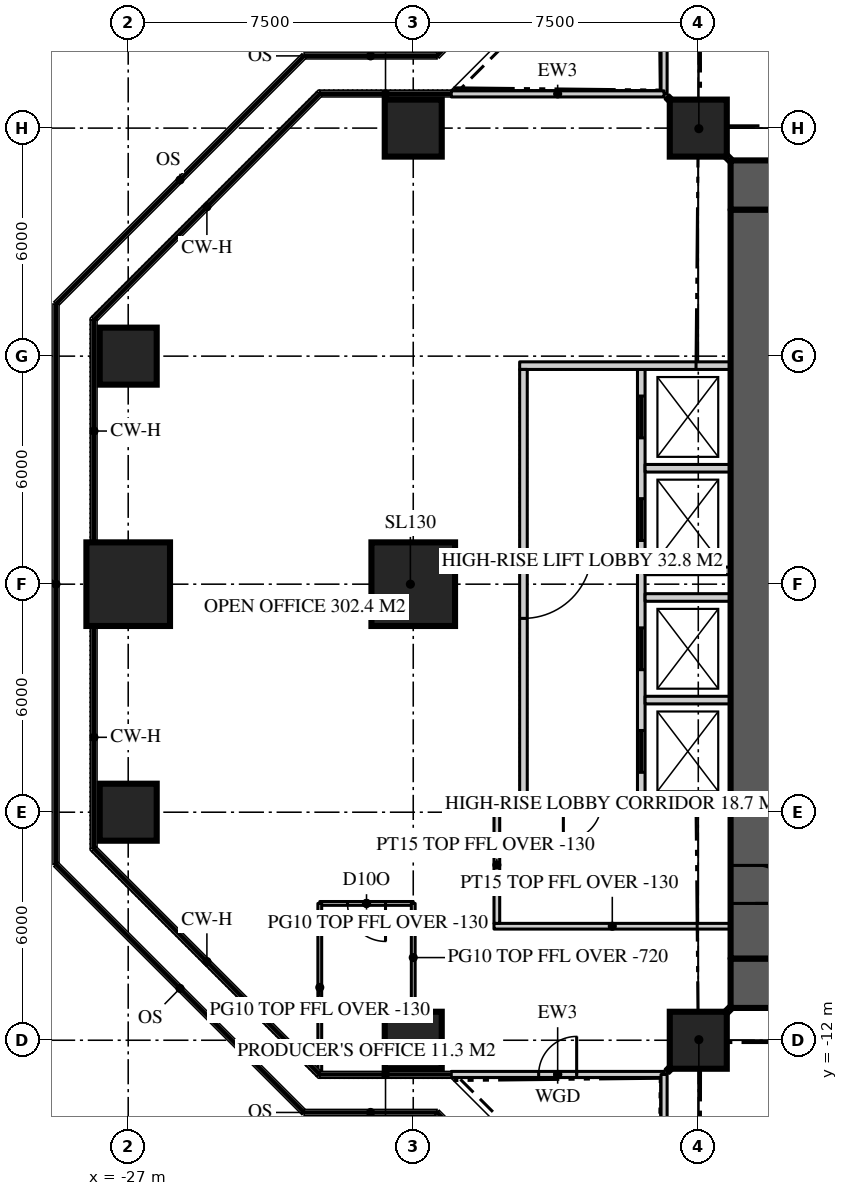
"""IFC4 building model, lengths in metres.
Left out: names, types, materials, properties, quantities, classifications, styles, units other than length and angle.
Written with IfcOpenShell. Run it as: python <this file> out.ifc"""

import sys

from ifc_helpers import new_model, si_unit, direction, frame, frame_2d, origin, origin_2d, place, context, subcontext, project, spatial, rectangle, extrude, element, fill, save


model = new_model("IFC4")
c1 = context("Model", 3, precision=1e-05, world=origin(), true_north=direction((0.0, 1.0)))
c2 = subcontext(c1, "Body", "Model", "MODEL_VIEW")
j1 = project(units=[si_unit("LENGTHUNIT", "METRE"), si_unit("PLANEANGLEUNIT", "RADIAN")], contexts=[c1])
p1 = place(None, origin())
s1 = spatial("IfcSite", under=j1, at=p1, CompositionType="ELEMENT")
p2 = place(p1, origin())
s2 = spatial("IfcBuilding", under=s1, at=p2, CompositionType="ELEMENT")
p3 = place(p2, frame((0.0, 0.0, 228.3)))
s3 = spatial("IfcBuildingStorey", under=s2, at=p3, CompositionType="ELEMENT", Elevation=228.3)
p4 = place(p3, frame((-11.15, 10.5, 0.0), z_axis=(0.0, 0.0, 1.0), x_axis=(1.0, 0.0, 0.0)))
e1 = element("IfcWall", 1, at=p4, inside=s3, PredefinedType="SHEAR", context=c2, shape_type="SweptSolid", body=[
    extrude(rectangle(XDim=22.3, YDim=1.3, at=frame_2d((11.15, 0.0))), origin(), (0.0, 0.0, 1.0), 3.9),
])
p5 = place(p4, frame((4.25, 0.0, 0.0)))
e2 = element("IfcOpeningElement", 2, at=p5, cuts=e1, PredefinedType="OPENING", context=c2, shape_type="SweptSolid", body=[
    extrude(rectangle(XDim=1.8, YDim=2.2, at=frame_2d((0.9, 1.1))), frame((0.0, 0.66, 0.0), z_axis=(0.0, -1.0, 0.0), x_axis=(1.0, 0.0, 0.0)), (0.0, 0.0, 1.0), 1.32),
])
p6 = place(p4, frame((16.25, 0.0, 0.0)))
e3 = element("IfcOpeningElement", 3, at=p6, cuts=e1, PredefinedType="OPENING", context=c2, shape_type="SweptSolid", body=[
    extrude(rectangle(XDim=1.8, YDim=2.2, at=frame_2d((0.9, 1.1))), frame((0.0, 0.66, 0.0), z_axis=(0.0, -1.0, 0.0), x_axis=(1.0, 0.0, 0.0)), (0.0, 0.0, 1.0), 1.32),
])
p7 = place(p3, frame((11.15, -10.5, 0.0), z_axis=(0.0, 0.0, 1.0), x_axis=(-1.0, 0.0, 0.0)))
e4 = element("IfcWall", 4, at=p7, inside=s3, PredefinedType="SHEAR", context=c2, shape_type="SweptSolid", body=[
    extrude(rectangle(XDim=22.3, YDim=1.3, at=frame_2d((11.15, 0.0))), origin(), (0.0, 0.0, 1.0), 3.9),
])
p8 = place(p7, frame((16.25, 0.0, 0.0)))
e5 = element("IfcOpeningElement", 5, at=p8, cuts=e4, PredefinedType="OPENING", context=c2, shape_type="SweptSolid", body=[
    extrude(rectangle(XDim=1.8, YDim=2.2, at=frame_2d((0.9, 1.1))), frame((0.0, 0.66, 0.0), z_axis=(0.0, -1.0, 0.0), x_axis=(1.0, 0.0, 0.0)), (0.0, 0.0, 1.0), 1.32),
])
p9 = place(p7, frame((4.25, 0.0, 0.0)))
e6 = element("IfcOpeningElement", 6, at=p9, cuts=e4, PredefinedType="OPENING", context=c2, shape_type="SweptSolid", body=[
    extrude(rectangle(XDim=1.8, YDim=2.2, at=frame_2d((0.9, 1.1))), frame((0.0, 0.66, 0.0), z_axis=(0.0, -1.0, 0.0), x_axis=(1.0, 0.0, 0.0)), (0.0, 0.0, 1.0), 1.32),
])
p10 = place(p3, frame((-10.5, 9.85, 0.0), z_axis=(0.0, 0.0, 1.0), x_axis=(0.0, -1.0, 0.0)))
e7 = element("IfcWall", 7, at=p10, inside=s3, PredefinedType="SHEAR", context=c2, shape_type="SweptSolid", body=[
    extrude(rectangle(XDim=19.7, YDim=1.3, at=frame_2d((9.85, 0.0))), origin(), (0.0, 0.0, 1.0), 3.9),
])
p11 = place(p10, frame((17.25, 0.0, 0.0)))
e8 = element("IfcOpeningElement", 8, at=p11, cuts=e7, PredefinedType="OPENING", context=c2, shape_type="SweptSolid", body=[
    extrude(rectangle(XDim=1.0, YDim=2.2, at=frame_2d((0.5, 1.1))), frame((0.0, 0.66, 0.0), z_axis=(0.0, -1.0, 0.0), x_axis=(1.0, 0.0, 0.0)), (0.0, 0.0, 1.0), 1.32),
])
for number, where, z_axis, x_axis in (
    (9, (-19.5, -12.0, 0.0), (0.0, 0.0, 1.0), (1.0, 0.0, 0.0)),
    (10, (-12.0, -12.0, 0.0), (0.0, 0.0, 1.0), (1.0, 0.0, 0.0)),
    (11, (-27.0, -6.0, 0.0), (0.0, 0.0, 1.0), (1.0, 0.0, 0.0)),
):
    element("IfcColumn", number, at=place(p3, frame(where, z_axis=z_axis, x_axis=x_axis)), inside=s3, PredefinedType="COLUMN", context=c2, shape_type="SweptSolid", body=[
        extrude(rectangle(XDim=1.5, YDim=1.5, at=origin_2d()), origin(), (0.0, 0.0, 1.0), 3.9),
    ])
for number, where, z_axis, x_axis in (
    (12, (-27.0, 0.0, 0.0), (0.0, 0.0, 1.0), (1.0, 0.0, 0.0)),
    (13, (-19.5, 0.0, 0.0), (0.0, 0.0, 1.0), (1.0, 0.0, 0.0)),
):
    element("IfcColumn", number, at=place(p3, frame(where, z_axis=z_axis, x_axis=x_axis)), inside=s3, PredefinedType="COLUMN", context=c2, shape_type="SweptSolid", body=[
        extrude(rectangle(XDim=2.2, YDim=2.2, at=origin_2d()), origin(), (0.0, 0.0, 1.0), 3.9),
    ])
for number, where, z_axis, x_axis in (
    (14, (-27.0, 6.0, 0.0), (0.0, 0.0, 1.0), (1.0, 0.0, 0.0)),
    (15, (-19.5, 12.0, 0.0), (0.0, 0.0, 1.0), (1.0, 0.0, 0.0)),
    (16, (-12.0, 12.0, 0.0), (0.0, 0.0, 1.0), (1.0, 0.0, 0.0)),
):
    element("IfcColumn", number, at=place(p3, frame(where, z_axis=z_axis, x_axis=x_axis)), inside=s3, PredefinedType="COLUMN", context=c2, shape_type="SweptSolid", body=[
        extrude(rectangle(XDim=1.5, YDim=1.5, at=origin_2d()), origin(), (0.0, 0.0, 1.0), 3.9),
    ])
p12 = place(p3, frame((-12.9, 18.5, 0.0), z_axis=(0.0, 0.0, 1.0), x_axis=(0.0, -1.0, 0.0)))
e17 = element("IfcWall", 17, at=p12, inside=s3, PredefinedType="SOLIDWALL", context=c2, shape_type="SweptSolid", body=[
    extrude(rectangle(XDim=5.6, YDim=0.16, at=frame_2d((2.8, 0.0))), origin(), (0.0, 0.0, 1.0), 3.77),
])
p13 = place(p12, frame((2.3, 0.0, 0.0)))
e18 = element("IfcOpeningElement", 18, at=p13, cuts=e17, PredefinedType="OPENING", context=c2, shape_type="SweptSolid", body=[
    extrude(rectangle(XDim=1.0, YDim=2.2, at=frame_2d((0.5, 1.1))), frame((0.0, 0.09, 0.0), z_axis=(0.0, -1.0, 0.0), x_axis=(1.0, 0.0, 0.0)), (0.0, 0.0, 1.0), 0.18),
])
p14 = place(p3, frame((-12.9, 12.9, 0.0), z_axis=(0.0, 0.0, 1.0), x_axis=(-1.0, 0.0, 0.0)))
e19 = element("IfcWall", 19, at=p14, inside=s3, PredefinedType="SOLIDWALL", context=c2, shape_type="SweptSolid", body=[
    extrude(rectangle(XDim=5.6, YDim=0.16, at=frame_2d((2.8, 0.0))), origin(), (0.0, 0.0, 1.0), 3.77),
])
p15 = place(p3, frame((-18.5, -12.9, 0.0), z_axis=(0.0, 0.0, 1.0), x_axis=(1.0, 0.0, 0.0)))
e20 = element("IfcWall", 20, at=p15, inside=s3, PredefinedType="SOLIDWALL", context=c2, shape_type="SweptSolid", body=[
    extrude(rectangle(XDim=5.6, YDim=0.16, at=frame_2d((2.8, 0.0))), origin(), (0.0, 0.0, 1.0), 3.77),
])
p16 = place(p15, frame((2.3, 0.0, 0.0)))
e21 = element("IfcOpeningElement", 21, at=p16, cuts=e20, PredefinedType="OPENING", context=c2, shape_type="SweptSolid", body=[
    extrude(rectangle(XDim=1.0, YDim=2.2, at=frame_2d((0.5, 1.1))), frame((0.0, 0.09, 0.0), z_axis=(0.0, -1.0, 0.0), x_axis=(1.0, 0.0, 0.0)), (0.0, 0.0, 1.0), 0.18),
])
p17 = place(p3, frame((-12.9, -12.9, 0.0), z_axis=(0.0, 0.0, 1.0), x_axis=(0.0, -1.0, 0.0)))
e22 = element("IfcWall", 22, at=p17, inside=s3, PredefinedType="SOLIDWALL", context=c2, shape_type="SweptSolid", body=[
    extrude(rectangle(XDim=5.6, YDim=0.16, at=frame_2d((2.8, 0.0))), origin(), (0.0, 0.0, 1.0), 3.77),
])
p18 = place(p3, frame((-19.5, -8.4, 0.0), z_axis=(0.0, 0.0, 1.0), x_axis=(-1.0, 0.0, 0.0)))
e23 = element("IfcWall", 23, at=p18, inside=s3, PredefinedType="PARTITIONING", context=c2, shape_type="SweptSolid", body=[
    extrude(rectangle(XDim=2.459, YDim=0.1, at=frame_2d((1.229, 0.0))), origin(), (0.0, 0.0, 1.0), 3.77),
])
p19 = place(p18, frame((0.729, 0.0, 0.0)))
e24 = element("IfcOpeningElement", 24, at=p19, cuts=e23, PredefinedType="OPENING", context=c2, shape_type="SweptSolid", body=[
    extrude(rectangle(XDim=1.0, YDim=2.2, at=frame_2d((0.5, 1.1))), frame((0.0, 0.06, 0.0), z_axis=(0.0, -1.0, 0.0), x_axis=(1.0, 0.0, 0.0)), (0.0, 0.0, 1.0), 0.12),
])
p20 = place(p3, frame((-19.5, -8.4, 0.0), z_axis=(0.0, 0.0, 1.0), x_axis=(0.0, -1.0, 0.0)))
e25 = element("IfcWall", 25, at=p20, inside=s3, PredefinedType="PARTITIONING", context=c2, shape_type="SweptSolid", body=[
    extrude(rectangle(XDim=2.85, YDim=0.1, at=frame_2d((1.425, 0.0))), origin(), (0.0, 0.0, 1.0), 3.18),
])
p21 = place(p3, frame((-21.959, -8.4, 0.0), z_axis=(0.0, 0.0, 1.0), x_axis=(0.0, -1.0, 0.0)))
e26 = element("IfcWall", 26, at=p21, inside=s3, PredefinedType="PARTITIONING", context=c2, shape_type="SweptSolid", body=[
    extrude(rectangle(XDim=4.42, YDim=0.1, at=frame_2d((2.21, 0.0))), origin(), (0.0, 0.0, 1.0), 3.77),
])
p22 = place(p3, frame((-13.5, 5.65, 0.0), z_axis=(0.0, 0.0, 1.0), x_axis=(0.0, -1.0, 0.0)))
e27 = element("IfcWall", 27, at=p22, inside=s3, PredefinedType="SOLIDWALL", context=c2, shape_type="SweptSolid", body=[
    extrude(rectangle(XDim=11.3, YDim=0.2, at=frame_2d((5.65, 0.0))), origin(), (0.0, 0.0, 1.0), 3.7),
])
p23 = place(p22, frame((0.7, 0.0, 0.0)))
e28 = element("IfcOpeningElement", 28, at=p23, cuts=e27, PredefinedType="OPENING", context=c2, shape_type="SweptSolid", body=[
    extrude(rectangle(XDim=1.1, YDim=2.2, at=frame_2d((0.55, 1.1))), frame((0.0, 0.11, 0.0), z_axis=(0.0, -1.0, 0.0), x_axis=(1.0, 0.0, 0.0)), (0.0, 0.0, 1.0), 0.22),
])
p24 = place(p22, frame((3.4, 0.0, 0.0)))
e29 = element("IfcOpeningElement", 29, at=p24, cuts=e27, PredefinedType="OPENING", context=c2, shape_type="SweptSolid", body=[
    extrude(rectangle(XDim=1.1, YDim=2.2, at=frame_2d((0.55, 1.1))), frame((0.0, 0.11, 0.0), z_axis=(0.0, -1.0, 0.0), x_axis=(1.0, 0.0, 0.0)), (0.0, 0.0, 1.0), 0.22),
])
p25 = place(p22, frame((6.8, 0.0, 0.0)))
e30 = element("IfcOpeningElement", 30, at=p25, cuts=e27, PredefinedType="OPENING", context=c2, shape_type="SweptSolid", body=[
    extrude(rectangle(XDim=1.1, YDim=2.2, at=frame_2d((0.55, 1.1))), frame((0.0, 0.11, 0.0), z_axis=(0.0, -1.0, 0.0), x_axis=(1.0, 0.0, 0.0)), (0.0, 0.0, 1.0), 0.22),
])
p26 = place(p22, frame((9.5, 0.0, 0.0)))
e31 = element("IfcOpeningElement", 31, at=p26, cuts=e27, PredefinedType="OPENING", context=c2, shape_type="SweptSolid", body=[
    extrude(rectangle(XDim=1.1, YDim=2.2, at=frame_2d((0.55, 1.1))), frame((0.0, 0.11, 0.0), z_axis=(0.0, -1.0, 0.0), x_axis=(1.0, 0.0, 0.0)), (0.0, 0.0, 1.0), 0.22),
])
p27 = place(p3, frame((-11.15, 5.75, 0.0), z_axis=(0.0, 0.0, 1.0), x_axis=(-1.0, 0.0, 0.0)))
e32 = element("IfcWall", 32, at=p27, inside=s3, PredefinedType="SOLIDWALL", context=c2, shape_type="SweptSolid", body=[
    extrude(rectangle(XDim=5.55, YDim=0.2, at=frame_2d((2.775, 0.0))), origin(), (0.0, 0.0, 1.0), 3.7),
])
p28 = place(p3, frame((-11.15, -5.75, 0.0), z_axis=(0.0, 0.0, 1.0), x_axis=(-1.0, 0.0, 0.0)))
e33 = element("IfcWall", 33, at=p28, inside=s3, PredefinedType="SOLIDWALL", context=c2, shape_type="SweptSolid", body=[
    extrude(rectangle(XDim=5.55, YDim=0.2, at=frame_2d((2.775, 0.0))), origin(), (0.0, 0.0, 1.0), 3.7),
])
p29 = place(p28, frame((3.4, 0.0, 0.0)))
e34 = element("IfcOpeningElement", 34, at=p29, cuts=e33, PredefinedType="OPENING", context=c2, shape_type="SweptSolid", body=[
    extrude(rectangle(XDim=1.0, YDim=2.2, at=frame_2d((0.5, 1.1))), frame((0.0, 0.11, 0.0), z_axis=(0.0, -1.0, 0.0), x_axis=(1.0, 0.0, 0.0)), (0.0, 0.0, 1.0), 0.22),
])
for number, where, z_axis, x_axis in (
    (35, (-11.15, 3.05, 0.0), (0.0, 0.0, 1.0), (-1.0, 0.0, 0.0)),
    (36, (-11.15, 0.35, 0.0), (0.0, 0.0, 1.0), (-1.0, 0.0, 0.0)),
    (37, (-11.15, -0.35, 0.0), (0.0, 0.0, 1.0), (-1.0, 0.0, 0.0)),
    (38, (-11.15, -3.05, 0.0), (0.0, 0.0, 1.0), (-1.0, 0.0, 0.0)),
):
    element("IfcWall", number, at=place(p3, frame(where, z_axis=z_axis, x_axis=x_axis)), inside=s3, PredefinedType="SOLIDWALL", context=c2, shape_type="SweptSolid", body=[
        extrude(rectangle(XDim=2.25, YDim=0.2, at=frame_2d((1.125, 0.0))), origin(), (0.0, 0.0, 1.0), 3.7),
    ])
p30 = place(p3, frame((-16.6, 5.65, 0.0), z_axis=(0.0, 0.0, 1.0), x_axis=(0.0, -1.0, 0.0)))
e39 = element("IfcWall", 39, at=p30, inside=s3, PredefinedType="SOLIDWALL", context=c2, shape_type="SweptSolid", body=[
    extrude(rectangle(XDim=11.3, YDim=0.2, at=frame_2d((5.65, 0.0))), origin(), (0.0, 0.0, 1.0), 3.18),
])
p31 = place(p30, frame((4.75, 0.0, 0.0)))
e40 = element("IfcOpeningElement", 40, at=p31, cuts=e39, PredefinedType="OPENING", context=c2, shape_type="SweptSolid", body=[
    extrude(rectangle(XDim=1.8, YDim=2.2, at=frame_2d((0.9, 1.1))), frame((0.0, 0.11, 0.0), z_axis=(0.0, -1.0, 0.0), x_axis=(1.0, 0.0, 0.0)), (0.0, 0.0, 1.0), 0.22),
])
for number, where, z_axis, x_axis in (
    (41, (-11.15, 11.15, 0.0), (0.0, 0.0, 1.0), (-0.707, 0.707, 0.0)),
    (42, (-11.15, -11.15, 0.0), (0.0, 0.0, 1.0), (-0.707, -0.707, 0.0)),
):
    element("IfcWall", number, at=place(p3, frame(where, z_axis=z_axis, x_axis=x_axis)), inside=s3, PredefinedType="PARTITIONING", context=c2, shape_type="SweptSolid", body=[
        extrude(rectangle(XDim=2.362, YDim=0.15, at=frame_2d((1.181, 0.0))), origin(), (0.0, 0.0, 1.0), 3.22),
    ])
p32 = place(p3, frame((-11.15, -9.0, 0.0), z_axis=(0.0, 0.0, 1.0), x_axis=(-1.0, 0.0, 0.0)))
e43 = element("IfcWall", 43, at=p32, inside=s3, PredefinedType="PARTITIONING", context=c2, shape_type="SweptSolid", body=[
    extrude(rectangle(XDim=6.225, YDim=0.15, at=frame_2d((3.113, 0.0))), origin(), (0.0, 0.0, 1.0), 3.77),
])
p33 = place(p3, frame((-17.3, -5.85, 0.0), z_axis=(0.0, 0.0, 1.0), x_axis=(0.0, -1.0, 0.0)))
e44 = element("IfcWall", 44, at=p33, inside=s3, PredefinedType="PARTITIONING", context=c2, shape_type="SweptSolid", body=[
    extrude(rectangle(XDim=3.075, YDim=0.15, at=frame_2d((1.538, 0.0))), origin(), (0.0, 0.0, 1.0), 3.77),
])
p34 = place(p16, origin())
e45 = element("IfcDoor", 45, at=p34, inside=s3, OperationType="SINGLE_SWING_RIGHT", PredefinedType="DOOR", context=c2, shape_type="SweptSolid", body=[
    extrude(rectangle(XDim=1.0, YDim=2.2, at=frame_2d((0.5, 1.1))), frame((0.0, 0.025, 0.0), z_axis=(0.0, -1.0, 0.0), x_axis=(1.0, 0.0, 0.0)), (0.0, 0.0, 1.0), 0.05),
])
fill(e21, e45)
p35 = place(p11, origin())
e46 = element("IfcDoor", 46, at=p35, inside=s3, OperationType="SINGLE_SWING_RIGHT", PredefinedType="DOOR", context=c2, shape_type="SweptSolid", body=[
    extrude(rectangle(XDim=1.0, YDim=2.2, at=frame_2d((0.5, 1.1))), frame((0.0, 0.025, 0.0), z_axis=(0.0, -1.0, 0.0), x_axis=(1.0, 0.0, 0.0)), (0.0, 0.0, 1.0), 0.05),
])
fill(e8, e46)
p36 = place(p19, origin())
e47 = element("IfcDoor", 47, at=p36, inside=s3, OperationType="SINGLE_SWING_LEFT", PredefinedType="DOOR", context=c2, shape_type="SweptSolid", body=[
    extrude(rectangle(XDim=1.0, YDim=2.2, at=frame_2d((0.5, 1.1))), frame((0.0, 0.025, 0.0), z_axis=(0.0, -1.0, 0.0), x_axis=(1.0, 0.0, 0.0)), (0.0, 0.0, 1.0), 0.05),
])
fill(e24, e47)
p37 = place(p31, origin())
e48 = element("IfcDoor", 48, at=p37, inside=s3, OperationType="DOUBLE_DOOR_DOUBLE_SWING", PredefinedType="DOOR", context=c2, shape_type="SweptSolid", body=[
    extrude(rectangle(XDim=1.8, YDim=2.2, at=frame_2d((0.9, 1.1))), frame((0.0, 0.025, 0.0), z_axis=(0.0, -1.0, 0.0), x_axis=(1.0, 0.0, 0.0)), (0.0, 0.0, 1.0), 0.05),
])
fill(e40, e48)
p38 = place(p23, origin())
e49 = element("IfcDoor", 49, at=p38, inside=s3, OperationType="SLIDING_TO_LEFT", PredefinedType="DOOR", context=c2, shape_type="SweptSolid", body=[
    extrude(rectangle(XDim=1.1, YDim=2.2, at=frame_2d((0.55, 1.1))), frame((0.0, 0.025, 0.0), z_axis=(0.0, -1.0, 0.0), x_axis=(1.0, 0.0, 0.0)), (0.0, 0.0, 1.0), 0.05),
])
fill(e28, e49)
p39 = place(p24, origin())
e50 = element("IfcDoor", 50, at=p39, inside=s3, OperationType="SLIDING_TO_LEFT", PredefinedType="DOOR", context=c2, shape_type="SweptSolid", body=[
    extrude(rectangle(XDim=1.1, YDim=2.2, at=frame_2d((0.55, 1.1))), frame((0.0, 0.025, 0.0), z_axis=(0.0, -1.0, 0.0), x_axis=(1.0, 0.0, 0.0)), (0.0, 0.0, 1.0), 0.05),
])
fill(e29, e50)
p40 = place(p25, origin())
e51 = element("IfcDoor", 51, at=p40, inside=s3, OperationType="SLIDING_TO_LEFT", PredefinedType="DOOR", context=c2, shape_type="SweptSolid", body=[
    extrude(rectangle(XDim=1.1, YDim=2.2, at=frame_2d((0.55, 1.1))), frame((0.0, 0.025, 0.0), z_axis=(0.0, -1.0, 0.0), x_axis=(1.0, 0.0, 0.0)), (0.0, 0.0, 1.0), 0.05),
])
fill(e30, e51)
p41 = place(p26, origin())
e52 = element("IfcDoor", 52, at=p41, inside=s3, OperationType="SLIDING_TO_LEFT", PredefinedType="DOOR", context=c2, shape_type="SweptSolid", body=[
    extrude(rectangle(XDim=1.1, YDim=2.2, at=frame_2d((0.55, 1.1))), frame((0.0, 0.025, 0.0), z_axis=(0.0, -1.0, 0.0), x_axis=(1.0, 0.0, 0.0)), (0.0, 0.0, 1.0), 0.05),
])
fill(e31, e52)
p42 = place(p29, origin())
e53 = element("IfcDoor", 53, at=p42, inside=s3, OperationType="SINGLE_SWING_RIGHT", PredefinedType="DOOR", context=c2, shape_type="SweptSolid", body=[
    extrude(rectangle(XDim=1.0, YDim=2.2, at=frame_2d((0.5, 1.1))), frame((0.0, 0.025, 0.0), z_axis=(0.0, -1.0, 0.0), x_axis=(1.0, 0.0, 0.0)), (0.0, 0.0, 1.0), 0.05),
])
fill(e34, e53)
save(model, sys.argv[1])
